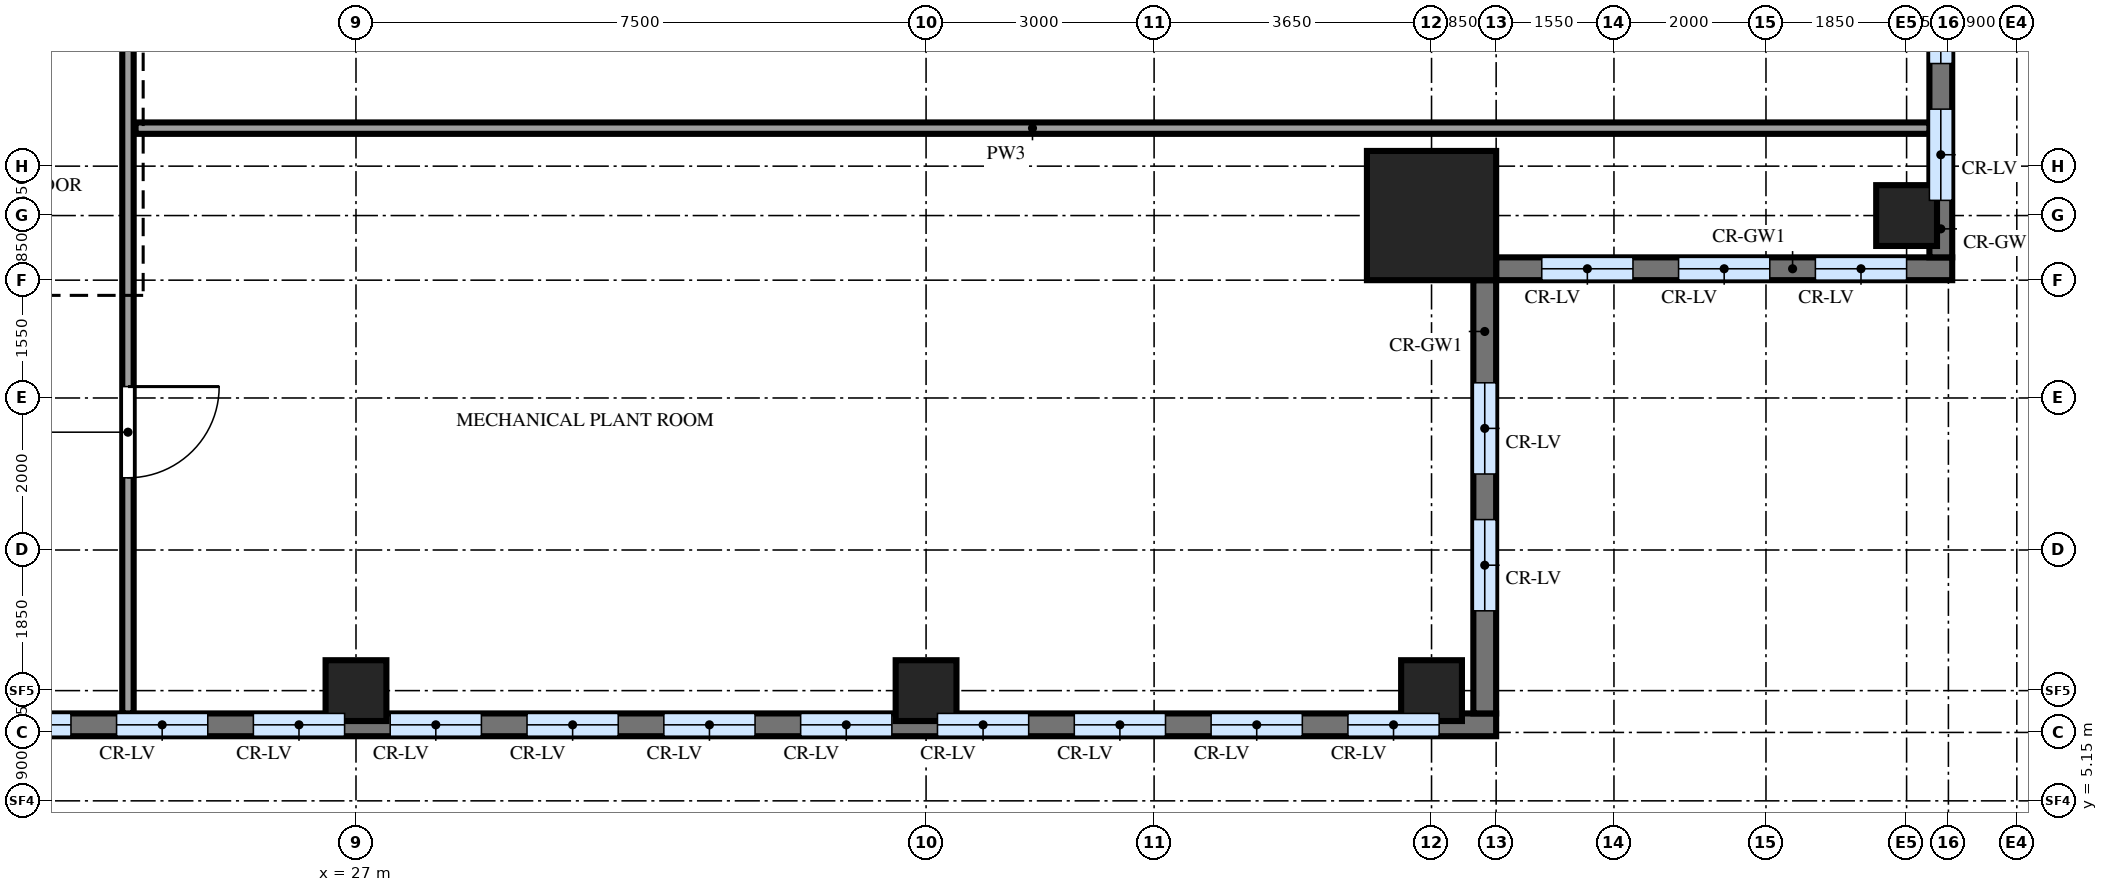
"""IFC4 building model, lengths in metres.
Left out: names, types, materials, properties, quantities, classifications, styles, units other than length and angle.
Written with IfcOpenShell. Run it as: python <this file> out.ifc"""

import sys

from ifc_helpers import new_model, si_unit, direction, frame, frame_2d, origin, origin_2d, place, context, subcontext, project, spatial, rectangle, extrude, source, transform, mapped, element, fill, save


model = new_model("IFC4")
c1 = context("Model", 3, precision=1e-05, world=origin(), true_north=direction((0.0, 1.0)))
c2 = subcontext(c1, "Body", "Model", "MODEL_VIEW")
j1 = project(units=[si_unit("LENGTHUNIT", "METRE"), si_unit("PLANEANGLEUNIT", "RADIAN")], contexts=[c1])
p1 = place(None, origin())
s1 = spatial("IfcSite", under=j1, at=p1, CompositionType="ELEMENT")
p2 = place(p1, origin())
s2 = spatial("IfcBuilding", under=s1, at=p2, CompositionType="ELEMENT")
p3 = place(p2, frame((0.0, 0.0, 330.2)))
s3 = spatial("IfcBuildingStorey", under=s2, at=p3, CompositionType="ELEMENT", Elevation=330.2)
m1 = source(origin(), c2, "Body", "SweptSolid", [
    extrude(rectangle(XDim=1.7, YDim=1.7, at=origin_2d()), origin(), (0.0, 0.0, 1.0), 4.5),
])
p4 = place(p3, frame((41.15, 12.85, 0.0), z_axis=(0.0, 0.0, 1.0), x_axis=(1.0, 0.0, 0.0)))
e1 = element("IfcColumn", 1, at=p4, inside=s3, PredefinedType="COLUMN", context=c2, shape_type="MappedRepresentation", body=[
    mapped(m1, transform((0.0, 0.0, 0.0))),
])
m2 = source(origin(), c2, "Body", "SweptSolid", [
    extrude(rectangle(XDim=0.8, YDim=0.8, at=origin_2d()), origin(), (0.0, 0.0, 1.0), 4.5),
])
for number, where, z_axis, x_axis in (
    (2, (27.0, 6.6, 0.0), (0.0, 0.0, 1.0), (1.0, 0.0, 0.0)),
    (3, (34.5, 6.6, 0.0), (0.0, 0.0, 1.0), (1.0, 0.0, 0.0)),
    (4, (41.15, 6.6, 0.0), (0.0, 0.0, 1.0), (1.0, 0.0, 0.0)),
    (5, (47.4, 12.85, 0.0), (0.0, 0.0, 1.0), (1.0, 0.0, 0.0)),
):
    element("IfcColumn", number, at=place(p3, frame(where, z_axis=z_axis, x_axis=x_axis)), inside=s3, PredefinedType="COLUMN", context=c2, shape_type="MappedRepresentation", body=[
        mapped(m2, transform((0.0, 0.0, 0.0))),
    ])
m3 = source(origin(), c2, "Body", "SweptSolid", [
    extrude(rectangle(XDim=29.7, YDim=0.3, at=frame_2d((14.85, 0.0))), origin(), (0.0, 0.0, 1.0), 4.5),
])
p5 = place(p3, frame((12.3, 6.15, 0.0), z_axis=(0.0, 0.0, 1.0), x_axis=(1.0, 0.0, 0.0)))
e6 = element("IfcWall", 6, at=p5, inside=s3, PredefinedType="SOLIDWALL", context=c2, shape_type="MappedRepresentation", body=[
    mapped(m3, transform((0.0, 0.0, 0.0))),
])
m4 = source(origin(), c2, "Body", "SweptSolid", [
    extrude(rectangle(XDim=1.2, YDim=2.4, at=frame_2d((0.6, 1.2))), frame((0.0, 0.16, 0.0), z_axis=(0.0, -1.0, 0.0), x_axis=(1.0, 0.0, 0.0)), (0.0, 0.0, 1.0), 0.32),
])
p6 = place(p5, frame((0.75, 0.0, 0.9)))
e7 = element("IfcOpeningElement", 7, at=p6, cuts=e6, PredefinedType="OPENING", context=c2, shape_type="MappedRepresentation", body=[
    mapped(m4, transform((0.0, 0.0, 0.0))),
])
p7 = place(p5, frame((2.55, 0.0, 0.9)))
e8 = element("IfcOpeningElement", 8, at=p7, cuts=e6, PredefinedType="OPENING", context=c2, shape_type="MappedRepresentation", body=[
    mapped(m4, transform((0.0, 0.0, 0.0))),
])
p8 = place(p5, frame((4.35, 0.0, 0.9)))
e9 = element("IfcOpeningElement", 9, at=p8, cuts=e6, PredefinedType="OPENING", context=c2, shape_type="MappedRepresentation", body=[
    mapped(m4, transform((0.0, 0.0, 0.0))),
])
p9 = place(p5, frame((6.15, 0.0, 0.9)))
e10 = element("IfcOpeningElement", 10, at=p9, cuts=e6, PredefinedType="OPENING", context=c2, shape_type="MappedRepresentation", body=[
    mapped(m4, transform((0.0, 0.0, 0.0))),
])
p10 = place(p5, frame((7.95, 0.0, 0.9)))
e11 = element("IfcOpeningElement", 11, at=p10, cuts=e6, PredefinedType="OPENING", context=c2, shape_type="MappedRepresentation", body=[
    mapped(m4, transform((0.0, 0.0, 0.0))),
])
p11 = place(p5, frame((9.75, 0.0, 0.9)))
e12 = element("IfcOpeningElement", 12, at=p11, cuts=e6, PredefinedType="OPENING", context=c2, shape_type="MappedRepresentation", body=[
    mapped(m4, transform((0.0, 0.0, 0.0))),
])
p12 = place(p5, frame((11.55, 0.0, 0.9)))
e13 = element("IfcOpeningElement", 13, at=p12, cuts=e6, PredefinedType="OPENING", context=c2, shape_type="MappedRepresentation", body=[
    mapped(m4, transform((0.0, 0.0, 0.0))),
])
p13 = place(p5, frame((13.35, 0.0, 0.9)))
e14 = element("IfcOpeningElement", 14, at=p13, cuts=e6, PredefinedType="OPENING", context=c2, shape_type="MappedRepresentation", body=[
    mapped(m4, transform((0.0, 0.0, 0.0))),
])
p14 = place(p5, frame((15.15, 0.0, 0.9)))
e15 = element("IfcOpeningElement", 15, at=p14, cuts=e6, PredefinedType="OPENING", context=c2, shape_type="MappedRepresentation", body=[
    mapped(m4, transform((0.0, 0.0, 0.0))),
])
p15 = place(p5, frame((16.95, 0.0, 0.9)))
e16 = element("IfcOpeningElement", 16, at=p15, cuts=e6, PredefinedType="OPENING", context=c2, shape_type="MappedRepresentation", body=[
    mapped(m4, transform((0.0, 0.0, 0.0))),
])
p16 = place(p5, frame((18.75, 0.0, 0.9)))
e17 = element("IfcOpeningElement", 17, at=p16, cuts=e6, PredefinedType="OPENING", context=c2, shape_type="MappedRepresentation", body=[
    mapped(m4, transform((0.0, 0.0, 0.0))),
])
p17 = place(p5, frame((20.55, 0.0, 0.9)))
e18 = element("IfcOpeningElement", 18, at=p17, cuts=e6, PredefinedType="OPENING", context=c2, shape_type="MappedRepresentation", body=[
    mapped(m4, transform((0.0, 0.0, 0.0))),
])
p18 = place(p5, frame((22.35, 0.0, 0.9)))
e19 = element("IfcOpeningElement", 19, at=p18, cuts=e6, PredefinedType="OPENING", context=c2, shape_type="MappedRepresentation", body=[
    mapped(m4, transform((0.0, 0.0, 0.0))),
])
p19 = place(p5, frame((24.15, 0.0, 0.9)))
e20 = element("IfcOpeningElement", 20, at=p19, cuts=e6, PredefinedType="OPENING", context=c2, shape_type="MappedRepresentation", body=[
    mapped(m4, transform((0.0, 0.0, 0.0))),
])
p20 = place(p5, frame((25.95, 0.0, 0.9)))
e21 = element("IfcOpeningElement", 21, at=p20, cuts=e6, PredefinedType="OPENING", context=c2, shape_type="MappedRepresentation", body=[
    mapped(m4, transform((0.0, 0.0, 0.0))),
])
p21 = place(p5, frame((27.75, 0.0, 0.9)))
e22 = element("IfcOpeningElement", 22, at=p21, cuts=e6, PredefinedType="OPENING", context=c2, shape_type="MappedRepresentation", body=[
    mapped(m4, transform((0.0, 0.0, 0.0))),
])
m5 = source(origin(), c2, "Body", "SweptSolid", [
    extrude(rectangle(XDim=5.7, YDim=0.3, at=frame_2d((2.85, 0.0))), origin(), (0.0, 0.0, 1.0), 4.5),
])
p22 = place(p3, frame((41.85, 6.3, 0.0), z_axis=(0.0, 0.0, 1.0), x_axis=(0.0, 1.0, 0.0)))
e23 = element("IfcWall", 23, at=p22, inside=s3, PredefinedType="SOLIDWALL", context=c2, shape_type="MappedRepresentation", body=[
    mapped(m5, transform((0.0, 0.0, 0.0))),
])
p23 = place(p22, frame((1.35, 0.0, 0.9)))
e24 = element("IfcOpeningElement", 24, at=p23, cuts=e23, PredefinedType="OPENING", context=c2, shape_type="MappedRepresentation", body=[
    mapped(m4, transform((0.0, 0.0, 0.0))),
])
p24 = place(p22, frame((3.15, 0.0, 0.9)))
e25 = element("IfcOpeningElement", 25, at=p24, cuts=e23, PredefinedType="OPENING", context=c2, shape_type="MappedRepresentation", body=[
    mapped(m4, transform((0.0, 0.0, 0.0))),
])
m6 = source(origin(), c2, "Body", "SweptSolid", [
    extrude(rectangle(XDim=6.0, YDim=0.3, at=frame_2d((3.0, 0.0))), origin(), (0.0, 0.0, 1.0), 4.5),
])
p25 = place(p3, frame((42.0, 12.15, 0.0), z_axis=(0.0, 0.0, 1.0), x_axis=(1.0, 0.0, 0.0)))
e26 = element("IfcWall", 26, at=p25, inside=s3, PredefinedType="SOLIDWALL", context=c2, shape_type="MappedRepresentation", body=[
    mapped(m6, transform((0.0, 0.0, 0.0))),
])
p26 = place(p25, frame((0.6, 0.0, 0.9)))
e27 = element("IfcOpeningElement", 27, at=p26, cuts=e26, PredefinedType="OPENING", context=c2, shape_type="MappedRepresentation", body=[
    mapped(m4, transform((0.0, 0.0, 0.0))),
])
p27 = place(p25, frame((2.4, 0.0, 0.9)))
e28 = element("IfcOpeningElement", 28, at=p27, cuts=e26, PredefinedType="OPENING", context=c2, shape_type="MappedRepresentation", body=[
    mapped(m4, transform((0.0, 0.0, 0.0))),
])
p28 = place(p25, frame((4.2, 0.0, 0.9)))
e29 = element("IfcOpeningElement", 29, at=p28, cuts=e26, PredefinedType="OPENING", context=c2, shape_type="MappedRepresentation", body=[
    mapped(m4, transform((0.0, 0.0, 0.0))),
])
p29 = place(p3, frame((47.85, 12.3, 0.0), z_axis=(0.0, 0.0, 1.0), x_axis=(0.0, 1.0, 0.0)))
e30 = element("IfcWall", 30, at=p29, inside=s3, PredefinedType="SOLIDWALL", context=c2, shape_type="MappedRepresentation", body=[
    mapped(m3, transform((0.0, 0.0, 0.0))),
])
p30 = place(p29, frame((0.75, 0.0, 0.9)))
e31 = element("IfcOpeningElement", 31, at=p30, cuts=e30, PredefinedType="OPENING", context=c2, shape_type="MappedRepresentation", body=[
    mapped(m4, transform((0.0, 0.0, 0.0))),
])
p31 = place(p29, frame((2.55, 0.0, 0.9)))
e32 = element("IfcOpeningElement", 32, at=p31, cuts=e30, PredefinedType="OPENING", context=c2, shape_type="MappedRepresentation", body=[
    mapped(m4, transform((0.0, 0.0, 0.0))),
])
p32 = place(p29, frame((4.35, 0.0, 0.9)))
e33 = element("IfcOpeningElement", 33, at=p32, cuts=e30, PredefinedType="OPENING", context=c2, shape_type="MappedRepresentation", body=[
    mapped(m4, transform((0.0, 0.0, 0.0))),
])
p33 = place(p29, frame((6.15, 0.0, 0.9)))
e34 = element("IfcOpeningElement", 34, at=p33, cuts=e30, PredefinedType="OPENING", context=c2, shape_type="MappedRepresentation", body=[
    mapped(m4, transform((0.0, 0.0, 0.0))),
])
p34 = place(p29, frame((7.95, 0.0, 0.9)))
e35 = element("IfcOpeningElement", 35, at=p34, cuts=e30, PredefinedType="OPENING", context=c2, shape_type="MappedRepresentation", body=[
    mapped(m4, transform((0.0, 0.0, 0.0))),
])
p35 = place(p29, frame((9.75, 0.0, 0.9)))
e36 = element("IfcOpeningElement", 36, at=p35, cuts=e30, PredefinedType="OPENING", context=c2, shape_type="MappedRepresentation", body=[
    mapped(m4, transform((0.0, 0.0, 0.0))),
])
p36 = place(p29, frame((11.55, 0.0, 0.9)))
e37 = element("IfcOpeningElement", 37, at=p36, cuts=e30, PredefinedType="OPENING", context=c2, shape_type="MappedRepresentation", body=[
    mapped(m4, transform((0.0, 0.0, 0.0))),
])
p37 = place(p29, frame((13.35, 0.0, 0.9)))
e38 = element("IfcOpeningElement", 38, at=p37, cuts=e30, PredefinedType="OPENING", context=c2, shape_type="MappedRepresentation", body=[
    mapped(m4, transform((0.0, 0.0, 0.0))),
])
p38 = place(p29, frame((15.15, 0.0, 0.9)))
e39 = element("IfcOpeningElement", 39, at=p38, cuts=e30, PredefinedType="OPENING", context=c2, shape_type="MappedRepresentation", body=[
    mapped(m4, transform((0.0, 0.0, 0.0))),
])
p39 = place(p29, frame((16.95, 0.0, 0.9)))
e40 = element("IfcOpeningElement", 40, at=p39, cuts=e30, PredefinedType="OPENING", context=c2, shape_type="MappedRepresentation", body=[
    mapped(m4, transform((0.0, 0.0, 0.0))),
])
p40 = place(p29, frame((18.75, 0.0, 0.9)))
e41 = element("IfcOpeningElement", 41, at=p40, cuts=e30, PredefinedType="OPENING", context=c2, shape_type="MappedRepresentation", body=[
    mapped(m4, transform((0.0, 0.0, 0.0))),
])
p41 = place(p29, frame((20.55, 0.0, 0.9)))
e42 = element("IfcOpeningElement", 42, at=p41, cuts=e30, PredefinedType="OPENING", context=c2, shape_type="MappedRepresentation", body=[
    mapped(m4, transform((0.0, 0.0, 0.0))),
])
p42 = place(p29, frame((22.35, 0.0, 0.9)))
e43 = element("IfcOpeningElement", 43, at=p42, cuts=e30, PredefinedType="OPENING", context=c2, shape_type="MappedRepresentation", body=[
    mapped(m4, transform((0.0, 0.0, 0.0))),
])
p43 = place(p29, frame((24.15, 0.0, 0.9)))
e44 = element("IfcOpeningElement", 44, at=p43, cuts=e30, PredefinedType="OPENING", context=c2, shape_type="MappedRepresentation", body=[
    mapped(m4, transform((0.0, 0.0, 0.0))),
])
p44 = place(p29, frame((25.95, 0.0, 0.9)))
e45 = element("IfcOpeningElement", 45, at=p44, cuts=e30, PredefinedType="OPENING", context=c2, shape_type="MappedRepresentation", body=[
    mapped(m4, transform((0.0, 0.0, 0.0))),
])
p45 = place(p29, frame((27.75, 0.0, 0.9)))
e46 = element("IfcOpeningElement", 46, at=p45, cuts=e30, PredefinedType="OPENING", context=c2, shape_type="MappedRepresentation", body=[
    mapped(m4, transform((0.0, 0.0, 0.0))),
])
m7 = source(origin(), c2, "Body", "SweptSolid", [
    extrude(rectangle(XDim=32.6, YDim=0.15, at=frame_2d((16.3, 0.0))), origin(), (0.0, 0.0, 1.0), 4.3),
])
p46 = place(p3, frame((24.0, 6.3, 0.0), z_axis=(0.0, 0.0, 1.0), x_axis=(0.0, 1.0, 0.0)))
e47 = element("IfcWall", 47, at=p46, inside=s3, PredefinedType="PARTITIONING", context=c2, shape_type="MappedRepresentation", body=[
    mapped(m7, transform((0.0, 0.0, 0.0))),
])
m8 = source(origin(), c2, "Body", "SweptSolid", [
    extrude(rectangle(XDim=1.2, YDim=2.1, at=frame_2d((0.6, 1.05))), frame((0.0, 0.085, 0.0), z_axis=(0.0, -1.0, 0.0), x_axis=(1.0, 0.0, 0.0)), (0.0, 0.0, 1.0), 0.17),
])
p47 = place(p46, frame((3.1, 0.0, 0.0)))
e48 = element("IfcOpeningElement", 48, at=p47, cuts=e47, PredefinedType="OPENING", context=c2, shape_type="MappedRepresentation", body=[
    mapped(m8, transform((0.0, 0.0, 0.0))),
])
p48 = place(p46, frame((12.6, 0.0, 0.0)))
e49 = element("IfcOpeningElement", 49, at=p48, cuts=e47, PredefinedType="OPENING", context=c2, shape_type="MappedRepresentation", body=[
    mapped(m8, transform((0.0, 0.0, 0.0))),
])
p49 = place(p46, frame((21.6, 0.0, 0.0)))
e50 = element("IfcOpeningElement", 50, at=p49, cuts=e47, PredefinedType="OPENING", context=c2, shape_type="MappedRepresentation", body=[
    mapped(m8, transform((0.0, 0.0, 0.0))),
])
m9 = source(origin(), c2, "Body", "SweptSolid", [
    extrude(rectangle(XDim=23.6, YDim=0.15, at=frame_2d((11.8, 0.0))), origin(), (0.0, 0.0, 1.0), 4.3),
])
p50 = place(p3, frame((24.1, 14.0, 0.0), z_axis=(0.0, 0.0, 1.0), x_axis=(1.0, 0.0, 0.0)))
e51 = element("IfcWall", 51, at=p50, inside=s3, PredefinedType="PARTITIONING", context=c2, shape_type="MappedRepresentation", body=[
    mapped(m9, transform((0.0, 0.0, 0.0))),
])
m10 = source(origin(), c2, "Body", "SweptSolid", [
    extrude(rectangle(XDim=1.2, YDim=2.4, at=frame_2d((0.6, 1.2))), frame((0.0, 0.03, 0.0), z_axis=(0.0, -1.0, 0.0), x_axis=(1.0, 0.0, 0.0)), (0.0, 0.0, 1.0), 0.06),
])
p51 = place(p11, origin())
e52 = element("IfcWindow", 52, at=p51, inside=s3, PartitioningType="SINGLE_PANEL", PredefinedType="WINDOW", context=c2, shape_type="MappedRepresentation", body=[
    mapped(m10, transform((0.0, 0.0, 0.0))),
])
fill(e12, e52)
p52 = place(p12, origin())
e53 = element("IfcWindow", 53, at=p52, inside=s3, PartitioningType="SINGLE_PANEL", PredefinedType="WINDOW", context=c2, shape_type="MappedRepresentation", body=[
    mapped(m10, transform((0.0, 0.0, 0.0))),
])
fill(e13, e53)
p53 = place(p13, origin())
e54 = element("IfcWindow", 54, at=p53, inside=s3, PartitioningType="SINGLE_PANEL", PredefinedType="WINDOW", context=c2, shape_type="MappedRepresentation", body=[
    mapped(m10, transform((0.0, 0.0, 0.0))),
])
fill(e14, e54)
p54 = place(p14, origin())
e55 = element("IfcWindow", 55, at=p54, inside=s3, PartitioningType="SINGLE_PANEL", PredefinedType="WINDOW", context=c2, shape_type="MappedRepresentation", body=[
    mapped(m10, transform((0.0, 0.0, 0.0))),
])
fill(e15, e55)
p55 = place(p15, origin())
e56 = element("IfcWindow", 56, at=p55, inside=s3, PartitioningType="SINGLE_PANEL", PredefinedType="WINDOW", context=c2, shape_type="MappedRepresentation", body=[
    mapped(m10, transform((0.0, 0.0, 0.0))),
])
fill(e16, e56)
p56 = place(p16, origin())
e57 = element("IfcWindow", 57, at=p56, inside=s3, PartitioningType="SINGLE_PANEL", PredefinedType="WINDOW", context=c2, shape_type="MappedRepresentation", body=[
    mapped(m10, transform((0.0, 0.0, 0.0))),
])
fill(e17, e57)
p57 = place(p17, origin())
e58 = element("IfcWindow", 58, at=p57, inside=s3, PartitioningType="SINGLE_PANEL", PredefinedType="WINDOW", context=c2, shape_type="MappedRepresentation", body=[
    mapped(m10, transform((0.0, 0.0, 0.0))),
])
fill(e18, e58)
p58 = place(p18, origin())
e59 = element("IfcWindow", 59, at=p58, inside=s3, PartitioningType="SINGLE_PANEL", PredefinedType="WINDOW", context=c2, shape_type="MappedRepresentation", body=[
    mapped(m10, transform((0.0, 0.0, 0.0))),
])
fill(e19, e59)
p59 = place(p19, origin())
e60 = element("IfcWindow", 60, at=p59, inside=s3, PartitioningType="SINGLE_PANEL", PredefinedType="WINDOW", context=c2, shape_type="MappedRepresentation", body=[
    mapped(m10, transform((0.0, 0.0, 0.0))),
])
fill(e20, e60)
p60 = place(p20, origin())
e61 = element("IfcWindow", 61, at=p60, inside=s3, PartitioningType="SINGLE_PANEL", PredefinedType="WINDOW", context=c2, shape_type="MappedRepresentation", body=[
    mapped(m10, transform((0.0, 0.0, 0.0))),
])
fill(e21, e61)
p61 = place(p21, origin())
e62 = element("IfcWindow", 62, at=p61, inside=s3, PartitioningType="SINGLE_PANEL", PredefinedType="WINDOW", context=c2, shape_type="MappedRepresentation", body=[
    mapped(m10, transform((0.0, 0.0, 0.0))),
])
fill(e22, e62)
p62 = place(p23, origin())
e63 = element("IfcWindow", 63, at=p62, inside=s3, PartitioningType="SINGLE_PANEL", PredefinedType="WINDOW", context=c2, shape_type="MappedRepresentation", body=[
    mapped(m10, transform((0.0, 0.0, 0.0))),
])
fill(e24, e63)
p63 = place(p24, origin())
e64 = element("IfcWindow", 64, at=p63, inside=s3, PartitioningType="SINGLE_PANEL", PredefinedType="WINDOW", context=c2, shape_type="MappedRepresentation", body=[
    mapped(m10, transform((0.0, 0.0, 0.0))),
])
fill(e25, e64)
p64 = place(p26, origin())
e65 = element("IfcWindow", 65, at=p64, inside=s3, PartitioningType="SINGLE_PANEL", PredefinedType="WINDOW", context=c2, shape_type="MappedRepresentation", body=[
    mapped(m10, transform((0.0, 0.0, 0.0))),
])
fill(e27, e65)
p65 = place(p27, origin())
e66 = element("IfcWindow", 66, at=p65, inside=s3, PartitioningType="SINGLE_PANEL", PredefinedType="WINDOW", context=c2, shape_type="MappedRepresentation", body=[
    mapped(m10, transform((0.0, 0.0, 0.0))),
])
fill(e28, e66)
p66 = place(p28, origin())
e67 = element("IfcWindow", 67, at=p66, inside=s3, PartitioningType="SINGLE_PANEL", PredefinedType="WINDOW", context=c2, shape_type="MappedRepresentation", body=[
    mapped(m10, transform((0.0, 0.0, 0.0))),
])
fill(e29, e67)
p67 = place(p30, origin())
e68 = element("IfcWindow", 68, at=p67, inside=s3, PartitioningType="SINGLE_PANEL", PredefinedType="WINDOW", context=c2, shape_type="MappedRepresentation", body=[
    mapped(m10, transform((0.0, 0.0, 0.0))),
])
fill(e31, e68)
p68 = place(p31, origin())
e69 = element("IfcWindow", 69, at=p68, inside=s3, PartitioningType="SINGLE_PANEL", PredefinedType="WINDOW", context=c2, shape_type="MappedRepresentation", body=[
    mapped(m10, transform((0.0, 0.0, 0.0))),
])
fill(e32, e69)
m11 = source(origin(), c2, "Body", "SweptSolid", [
    extrude(rectangle(XDim=1.2, YDim=2.1, at=frame_2d((0.6, 1.05))), frame((0.0, 0.025, 0.0), z_axis=(0.0, -1.0, 0.0), x_axis=(1.0, 0.0, 0.0)), (0.0, 0.0, 1.0), 0.05),
])
p69 = place(p47, origin())
e70 = element("IfcDoor", 70, at=p69, inside=s3, OperationType="SINGLE_SWING_RIGHT", PredefinedType="DOOR", context=c2, shape_type="MappedRepresentation", body=[
    mapped(m11, transform((0.0, 0.0, 0.0))),
])
fill(e48, e70)
save(model, sys.argv[1])
